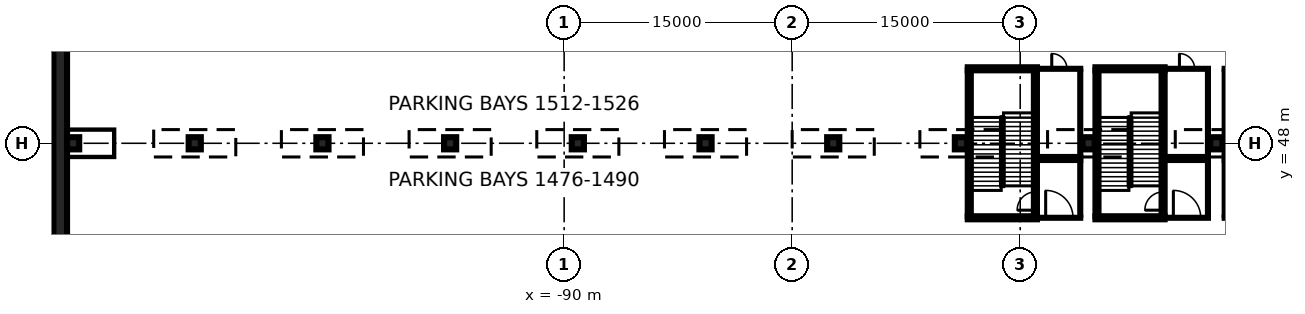
"""IFC4 building model, lengths in metres.
Left out: names, types, materials, properties, quantities, classifications, styles, units other than length and angle.
Written with IfcOpenShell. Run it as: python <this file> out.ifc"""

import sys

from ifc_helpers import new_model, si_unit, direction, frame, frame_2d, origin, origin_2d, place, context, subcontext, project, spatial, rectangle, extrude, element, fill, save


model = new_model("IFC4")
c1 = context("Model", 3, precision=1e-05, world=origin(), true_north=direction((0.0, 1.0)))
c2 = subcontext(c1, "Body", "Model", "MODEL_VIEW")
j1 = project(units=[si_unit("LENGTHUNIT", "METRE"), si_unit("PLANEANGLEUNIT", "RADIAN")], contexts=[c1])
p1 = place(None, origin())
s1 = spatial("IfcSite", under=j1, at=p1, CompositionType="ELEMENT")
p2 = place(p1, origin())
s2 = spatial("IfcBuilding", under=s1, at=p2, CompositionType="ELEMENT")
p3 = place(p2, frame((0.0, 0.0, -12.0)))
s3 = spatial("IfcBuildingStorey", under=s2, at=p3, CompositionType="ELEMENT", Elevation=-12.0)
p4 = place(p3, frame((-123.15, -80.0, 0.0), z_axis=(0.0, 0.0, 1.0), x_axis=(0.0, 1.0, 0.0)))
e1 = element("IfcWall", 1, at=p4, inside=s3, PredefinedType="USERDEFINED", context=c2, shape_type="SweptSolid", body=[
    extrude(rectangle(XDim=160.0, YDim=0.9, at=frame_2d((80.0, 0.0))), origin(), (0.0, 0.0, 1.0), 11.55),
])
for number, where, z_axis, x_axis in (
    (2, (-122.3, 48.0, 0.0), (0.0, 0.0, 1.0), (1.0, 0.0, 0.0)),
    (3, (-114.3, 48.0, 0.0), (0.0, 0.0, 1.0), (1.0, 0.0, 0.0)),
    (4, (-105.9, 48.0, 0.0), (0.0, 0.0, 1.0), (1.0, 0.0, 0.0)),
    (5, (-97.5, 48.0, 0.0), (0.0, 0.0, 1.0), (1.0, 0.0, 0.0)),
    (6, (-89.1, 48.0, 0.0), (0.0, 0.0, 1.0), (1.0, 0.0, 0.0)),
    (7, (-80.7, 48.0, 0.0), (0.0, 0.0, 1.0), (1.0, 0.0, 0.0)),
    (8, (-72.3, 48.0, 0.0), (0.0, 0.0, 1.0), (1.0, 0.0, 0.0)),
    (9, (-63.9, 48.0, 0.0), (0.0, 0.0, 1.0), (1.0, 0.0, 0.0)),
    (10, (-55.5, 48.0, 0.0), (0.0, 0.0, 1.0), (1.0, 0.0, 0.0)),
    (11, (-47.1, 48.0, 0.0), (0.0, 0.0, 1.0), (1.0, 0.0, 0.0)),
):
    element("IfcColumn", number, at=place(p3, frame(where, z_axis=z_axis, x_axis=x_axis)), inside=s3, PredefinedType="COLUMN", context=c2, shape_type="SweptSolid", body=[
        extrude(rectangle(XDim=0.8, YDim=0.8, at=origin_2d()), origin(), (0.0, 0.0, 1.0), 4.4),
    ])
p5 = place(p3, frame((-58.9, 43.1, 0.0), z_axis=(0.0, 0.0, 1.0), x_axis=(1.0, 0.0, 0.0)))
e12 = element("IfcWall", 12, at=p5, inside=s3, PredefinedType="PARTITIONING", context=c2, shape_type="SweptSolid", body=[
    extrude(rectangle(XDim=2.95, YDim=0.2, at=frame_2d((1.475, 0.0))), origin(), (0.0, 0.0, 1.0), 4.4),
])
p6 = place(p5, frame((0.575, 0.0, 0.0)))
e13 = element("IfcOpeningElement", 13, at=p6, cuts=e12, PredefinedType="OPENING", context=c2, shape_type="SweptSolid", body=[
    extrude(rectangle(XDim=1.8, YDim=2.1, at=frame_2d((0.9, 1.05))), frame((0.0, 0.11, 0.0), z_axis=(0.0, -1.0, 0.0), x_axis=(1.0, 0.0, 0.0)), (0.0, 0.0, 1.0), 0.22),
])
p7 = place(p3, frame((-58.9, 46.9, 0.0), z_axis=(0.0, 0.0, 1.0), x_axis=(1.0, 0.0, 0.0)))
e14 = element("IfcWall", 14, at=p7, inside=s3, PredefinedType="PARTITIONING", context=c2, shape_type="SweptSolid", body=[
    extrude(rectangle(XDim=2.95, YDim=0.2, at=frame_2d((1.475, 0.0))), origin(), (0.0, 0.0, 1.0), 4.4),
])
p8 = place(p3, frame((-56.05, 43.2, 0.0), z_axis=(0.0, 0.0, 1.0), x_axis=(0.0, 1.0, 0.0)))
e15 = element("IfcWall", 15, at=p8, inside=s3, PredefinedType="PARTITIONING", context=c2, shape_type="SweptSolid", body=[
    extrude(rectangle(XDim=3.6, YDim=0.2, at=frame_2d((1.8, 0.0))), origin(), (0.0, 0.0, 1.0), 4.4),
])
p9 = place(p3, frame((-58.9, 47.1, 0.0), z_axis=(0.0, 0.0, 1.0), x_axis=(1.0, 0.0, 0.0)))
e16 = element("IfcWall", 16, at=p9, inside=s3, PredefinedType="PARTITIONING", context=c2, shape_type="SweptSolid", body=[
    extrude(rectangle(XDim=2.95, YDim=0.2, at=frame_2d((1.475, 0.0))), origin(), (0.0, 0.0, 1.0), 4.4),
])
p10 = place(p3, frame((-58.9, 52.9, 0.0), z_axis=(0.0, 0.0, 1.0), x_axis=(1.0, 0.0, 0.0)))
e17 = element("IfcWall", 17, at=p10, inside=s3, PredefinedType="PARTITIONING", context=c2, shape_type="SweptSolid", body=[
    extrude(rectangle(XDim=2.95, YDim=0.2, at=frame_2d((1.475, 0.0))), origin(), (0.0, 0.0, 1.0), 4.4),
])
p11 = place(p10, frame((0.975, 0.0, 0.0)))
e18 = element("IfcOpeningElement", 18, at=p11, cuts=e17, PredefinedType="OPENING", context=c2, shape_type="SweptSolid", body=[
    extrude(rectangle(XDim=1.0, YDim=2.1, at=frame_2d((0.5, 1.05))), frame((0.0, 0.11, 0.0), z_axis=(0.0, -1.0, 0.0), x_axis=(1.0, 0.0, 0.0)), (0.0, 0.0, 1.0), 0.22),
])
p12 = place(p3, frame((-56.05, 47.2, 0.0), z_axis=(0.0, 0.0, 1.0), x_axis=(0.0, 1.0, 0.0)))
e19 = element("IfcWall", 19, at=p12, inside=s3, PredefinedType="PARTITIONING", context=c2, shape_type="SweptSolid", body=[
    extrude(rectangle(XDim=5.6, YDim=0.2, at=frame_2d((2.8, 0.0))), origin(), (0.0, 0.0, 1.0), 4.4),
])
p13 = place(p3, frame((-50.5, 43.1, 0.0), z_axis=(0.0, 0.0, 1.0), x_axis=(1.0, 0.0, 0.0)))
e20 = element("IfcWall", 20, at=p13, inside=s3, PredefinedType="PARTITIONING", context=c2, shape_type="SweptSolid", body=[
    extrude(rectangle(XDim=2.95, YDim=0.2, at=frame_2d((1.475, 0.0))), origin(), (0.0, 0.0, 1.0), 4.4),
])
p14 = place(p13, frame((0.575, 0.0, 0.0)))
e21 = element("IfcOpeningElement", 21, at=p14, cuts=e20, PredefinedType="OPENING", context=c2, shape_type="SweptSolid", body=[
    extrude(rectangle(XDim=1.8, YDim=2.1, at=frame_2d((0.9, 1.05))), frame((0.0, 0.11, 0.0), z_axis=(0.0, -1.0, 0.0), x_axis=(1.0, 0.0, 0.0)), (0.0, 0.0, 1.0), 0.22),
])
p15 = place(p3, frame((-50.5, 46.9, 0.0), z_axis=(0.0, 0.0, 1.0), x_axis=(1.0, 0.0, 0.0)))
e22 = element("IfcWall", 22, at=p15, inside=s3, PredefinedType="PARTITIONING", context=c2, shape_type="SweptSolid", body=[
    extrude(rectangle(XDim=2.95, YDim=0.2, at=frame_2d((1.475, 0.0))), origin(), (0.0, 0.0, 1.0), 4.4),
])
p16 = place(p3, frame((-47.65, 43.2, 0.0), z_axis=(0.0, 0.0, 1.0), x_axis=(0.0, 1.0, 0.0)))
e23 = element("IfcWall", 23, at=p16, inside=s3, PredefinedType="PARTITIONING", context=c2, shape_type="SweptSolid", body=[
    extrude(rectangle(XDim=3.6, YDim=0.2, at=frame_2d((1.8, 0.0))), origin(), (0.0, 0.0, 1.0), 4.4),
])
p17 = place(p3, frame((-50.5, 47.1, 0.0), z_axis=(0.0, 0.0, 1.0), x_axis=(1.0, 0.0, 0.0)))
e24 = element("IfcWall", 24, at=p17, inside=s3, PredefinedType="PARTITIONING", context=c2, shape_type="SweptSolid", body=[
    extrude(rectangle(XDim=2.95, YDim=0.2, at=frame_2d((1.475, 0.0))), origin(), (0.0, 0.0, 1.0), 4.4),
])
p18 = place(p3, frame((-50.5, 52.9, 0.0), z_axis=(0.0, 0.0, 1.0), x_axis=(1.0, 0.0, 0.0)))
e25 = element("IfcWall", 25, at=p18, inside=s3, PredefinedType="PARTITIONING", context=c2, shape_type="SweptSolid", body=[
    extrude(rectangle(XDim=2.95, YDim=0.2, at=frame_2d((1.475, 0.0))), origin(), (0.0, 0.0, 1.0), 4.4),
])
p19 = place(p18, frame((0.975, 0.0, 0.0)))
e26 = element("IfcOpeningElement", 26, at=p19, cuts=e25, PredefinedType="OPENING", context=c2, shape_type="SweptSolid", body=[
    extrude(rectangle(XDim=1.0, YDim=2.1, at=frame_2d((0.5, 1.05))), frame((0.0, 0.11, 0.0), z_axis=(0.0, -1.0, 0.0), x_axis=(1.0, 0.0, 0.0)), (0.0, 0.0, 1.0), 0.22),
])
p20 = place(p3, frame((-47.65, 47.2, 0.0), z_axis=(0.0, 0.0, 1.0), x_axis=(0.0, 1.0, 0.0)))
e27 = element("IfcWall", 27, at=p20, inside=s3, PredefinedType="PARTITIONING", context=c2, shape_type="SweptSolid", body=[
    extrude(rectangle(XDim=5.6, YDim=0.2, at=frame_2d((2.8, 0.0))), origin(), (0.0, 0.0, 1.0), 4.4),
])
p21 = place(p3, frame((-46.65, 43.1, 0.0), z_axis=(0.0, 0.0, 1.0), x_axis=(1.0, 0.0, 0.0)))
e28 = element("IfcWall", 28, at=p21, inside=s3, PredefinedType="PARTITIONING", context=c2, shape_type="SweptSolid", body=[
    extrude(rectangle(XDim=2.95, YDim=0.2, at=frame_2d((1.475, 0.0))), origin(), (0.0, 0.0, 1.0), 4.4),
])
p22 = place(p21, frame((0.575, 0.0, 0.0)))
e29 = element("IfcOpeningElement", 29, at=p22, cuts=e28, PredefinedType="OPENING", context=c2, shape_type="SweptSolid", body=[
    extrude(rectangle(XDim=1.8, YDim=2.1, at=frame_2d((0.9, 1.05))), frame((0.0, 0.11, 0.0), z_axis=(0.0, -1.0, 0.0), x_axis=(1.0, 0.0, 0.0)), (0.0, 0.0, 1.0), 0.22),
])
p23 = place(p3, frame((-46.65, 46.9, 0.0), z_axis=(0.0, 0.0, 1.0), x_axis=(1.0, 0.0, 0.0)))
e30 = element("IfcWall", 30, at=p23, inside=s3, PredefinedType="PARTITIONING", context=c2, shape_type="SweptSolid", body=[
    extrude(rectangle(XDim=2.95, YDim=0.2, at=frame_2d((1.475, 0.0))), origin(), (0.0, 0.0, 1.0), 4.4),
])
p24 = place(p3, frame((-46.55, 43.2, 0.0), z_axis=(0.0, 0.0, 1.0), x_axis=(0.0, 1.0, 0.0)))
e31 = element("IfcWall", 31, at=p24, inside=s3, PredefinedType="PARTITIONING", context=c2, shape_type="SweptSolid", body=[
    extrude(rectangle(XDim=3.6, YDim=0.2, at=frame_2d((1.8, 0.0))), origin(), (0.0, 0.0, 1.0), 4.4),
])
p25 = place(p3, frame((-46.65, 47.1, 0.0), z_axis=(0.0, 0.0, 1.0), x_axis=(1.0, 0.0, 0.0)))
e32 = element("IfcWall", 32, at=p25, inside=s3, PredefinedType="PARTITIONING", context=c2, shape_type="SweptSolid", body=[
    extrude(rectangle(XDim=2.95, YDim=0.2, at=frame_2d((1.475, 0.0))), origin(), (0.0, 0.0, 1.0), 4.4),
])
p26 = place(p3, frame((-46.65, 52.9, 0.0), z_axis=(0.0, 0.0, 1.0), x_axis=(1.0, 0.0, 0.0)))
e33 = element("IfcWall", 33, at=p26, inside=s3, PredefinedType="PARTITIONING", context=c2, shape_type="SweptSolid", body=[
    extrude(rectangle(XDim=2.95, YDim=0.2, at=frame_2d((1.475, 0.0))), origin(), (0.0, 0.0, 1.0), 4.4),
])
p27 = place(p26, frame((0.975, 0.0, 0.0)))
e34 = element("IfcOpeningElement", 34, at=p27, cuts=e33, PredefinedType="OPENING", context=c2, shape_type="SweptSolid", body=[
    extrude(rectangle(XDim=1.0, YDim=2.1, at=frame_2d((0.5, 1.05))), frame((0.0, 0.11, 0.0), z_axis=(0.0, -1.0, 0.0), x_axis=(1.0, 0.0, 0.0)), (0.0, 0.0, 1.0), 0.22),
])
p28 = place(p3, frame((-46.55, 47.2, 0.0), z_axis=(0.0, 0.0, 1.0), x_axis=(0.0, 1.0, 0.0)))
e35 = element("IfcWall", 35, at=p28, inside=s3, PredefinedType="PARTITIONING", context=c2, shape_type="SweptSolid", body=[
    extrude(rectangle(XDim=5.6, YDim=0.2, at=frame_2d((2.8, 0.0))), origin(), (0.0, 0.0, 1.0), 4.4),
])
p29 = place(p3, frame((-63.35, 43.2, 0.0), z_axis=(0.0, 0.0, 1.0), x_axis=(0.0, 1.0, 0.0)))
e36 = element("IfcWall", 36, at=p29, inside=s3, PredefinedType="SOLIDWALL", context=c2, shape_type="SweptSolid", body=[
    extrude(rectangle(XDim=9.6, YDim=0.2, at=frame_2d((4.8, 0.0))), origin(), (0.0, 0.0, 1.0), 4.4),
])
p30 = place(p3, frame((-59.0, 43.2, 0.0), z_axis=(0.0, 0.0, 1.0), x_axis=(0.0, 1.0, 0.0)))
e37 = element("IfcWall", 37, at=p30, inside=s3, PredefinedType="SOLIDWALL", context=c2, shape_type="SweptSolid", body=[
    extrude(rectangle(XDim=9.6, YDim=0.2, at=frame_2d((4.8, 0.0))), origin(), (0.0, 0.0, 1.0), 4.4),
])
p31 = place(p30, frame((0.4, 0.0, 0.0)))
e38 = element("IfcOpeningElement", 38, at=p31, cuts=e37, PredefinedType="OPENING", context=c2, shape_type="SweptSolid", body=[
    extrude(rectangle(XDim=1.2, YDim=2.1, at=frame_2d((0.6, 1.05))), frame((0.0, 0.11, 0.0), z_axis=(0.0, -1.0, 0.0), x_axis=(1.0, 0.0, 0.0)), (0.0, 0.0, 1.0), 0.22),
])
for number, where, z_axis, x_axis in (
    (39, (-58.9, 43.1, 0.0), (0.0, 0.0, 1.0), (-1.0, 0.0, 0.0)),
    (40, (-63.45, 52.9, 0.0), (0.0, 0.0, 1.0), (1.0, 0.0, 0.0)),
):
    element("IfcWall", number, at=place(p3, frame(where, z_axis=z_axis, x_axis=x_axis)), inside=s3, PredefinedType="SOLIDWALL", context=c2, shape_type="SweptSolid", body=[
        extrude(rectangle(XDim=4.55, YDim=0.2, at=frame_2d((2.275, 0.0))), origin(), (0.0, 0.0, 1.0), 4.4),
    ])
p32 = place(p3, frame((-54.95, 43.2, 0.0), z_axis=(0.0, 0.0, 1.0), x_axis=(0.0, 1.0, 0.0)))
e41 = element("IfcWall", 41, at=p32, inside=s3, PredefinedType="SOLIDWALL", context=c2, shape_type="SweptSolid", body=[
    extrude(rectangle(XDim=9.6, YDim=0.2, at=frame_2d((4.8, 0.0))), origin(), (0.0, 0.0, 1.0), 4.4),
])
p33 = place(p3, frame((-50.6, 43.2, 0.0), z_axis=(0.0, 0.0, 1.0), x_axis=(0.0, 1.0, 0.0)))
e42 = element("IfcWall", 42, at=p33, inside=s3, PredefinedType="SOLIDWALL", context=c2, shape_type="SweptSolid", body=[
    extrude(rectangle(XDim=9.6, YDim=0.2, at=frame_2d((4.8, 0.0))), origin(), (0.0, 0.0, 1.0), 4.4),
])
p34 = place(p33, frame((0.4, 0.0, 0.0)))
e43 = element("IfcOpeningElement", 43, at=p34, cuts=e42, PredefinedType="OPENING", context=c2, shape_type="SweptSolid", body=[
    extrude(rectangle(XDim=1.2, YDim=2.1, at=frame_2d((0.6, 1.05))), frame((0.0, 0.11, 0.0), z_axis=(0.0, -1.0, 0.0), x_axis=(1.0, 0.0, 0.0)), (0.0, 0.0, 1.0), 0.22),
])
for number, where, z_axis, x_axis in (
    (44, (-50.5, 43.1, 0.0), (0.0, 0.0, 1.0), (-1.0, 0.0, 0.0)),
    (45, (-55.05, 52.9, 0.0), (0.0, 0.0, 1.0), (1.0, 0.0, 0.0)),
):
    element("IfcWall", number, at=place(p3, frame(where, z_axis=z_axis, x_axis=x_axis)), inside=s3, PredefinedType="SOLIDWALL", context=c2, shape_type="SweptSolid", body=[
        extrude(rectangle(XDim=4.55, YDim=0.2, at=frame_2d((2.275, 0.0))), origin(), (0.0, 0.0, 1.0), 4.4),
    ])
p35 = place(p6, origin())
e46 = element("IfcDoor", 46, at=p35, inside=s3, OperationType="DOUBLE_DOOR_SINGLE_SWING", PredefinedType="DOOR", context=c2, shape_type="SweptSolid", body=[
    extrude(rectangle(XDim=1.8, YDim=2.1, at=frame_2d((0.9, 1.05))), frame((0.0, 0.025, 0.0), z_axis=(0.0, -1.0, 0.0), x_axis=(1.0, 0.0, 0.0)), (0.0, 0.0, 1.0), 0.05),
])
fill(e13, e46)
p36 = place(p11, origin())
e47 = element("IfcDoor", 47, at=p36, inside=s3, OperationType="SINGLE_SWING_LEFT", PredefinedType="DOOR", context=c2, shape_type="SweptSolid", body=[
    extrude(rectangle(XDim=1.0, YDim=2.1, at=frame_2d((0.5, 1.05))), frame((0.0, 0.025, 0.0), z_axis=(0.0, -1.0, 0.0), x_axis=(1.0, 0.0, 0.0)), (0.0, 0.0, 1.0), 0.05),
])
fill(e18, e47)
p37 = place(p14, origin())
e48 = element("IfcDoor", 48, at=p37, inside=s3, OperationType="DOUBLE_DOOR_SINGLE_SWING", PredefinedType="DOOR", context=c2, shape_type="SweptSolid", body=[
    extrude(rectangle(XDim=1.8, YDim=2.1, at=frame_2d((0.9, 1.05))), frame((0.0, 0.025, 0.0), z_axis=(0.0, -1.0, 0.0), x_axis=(1.0, 0.0, 0.0)), (0.0, 0.0, 1.0), 0.05),
])
fill(e21, e48)
p38 = place(p19, origin())
e49 = element("IfcDoor", 49, at=p38, inside=s3, OperationType="SINGLE_SWING_LEFT", PredefinedType="DOOR", context=c2, shape_type="SweptSolid", body=[
    extrude(rectangle(XDim=1.0, YDim=2.1, at=frame_2d((0.5, 1.05))), frame((0.0, 0.025, 0.0), z_axis=(0.0, -1.0, 0.0), x_axis=(1.0, 0.0, 0.0)), (0.0, 0.0, 1.0), 0.05),
])
fill(e26, e49)
p39 = place(p31, origin())
e50 = element("IfcDoor", 50, at=p39, inside=s3, OperationType="SINGLE_SWING_LEFT", PredefinedType="DOOR", context=c2, shape_type="SweptSolid", body=[
    extrude(rectangle(XDim=1.2, YDim=2.1, at=frame_2d((0.6, 1.05))), frame((0.0, 0.025, 0.0), z_axis=(0.0, -1.0, 0.0), x_axis=(1.0, 0.0, 0.0)), (0.0, 0.0, 1.0), 0.05),
])
fill(e38, e50)
p40 = place(p34, origin())
e51 = element("IfcDoor", 51, at=p40, inside=s3, OperationType="SINGLE_SWING_LEFT", PredefinedType="DOOR", context=c2, shape_type="SweptSolid", body=[
    extrude(rectangle(XDim=1.2, YDim=2.1, at=frame_2d((0.6, 1.05))), frame((0.0, 0.025, 0.0), z_axis=(0.0, -1.0, 0.0), x_axis=(1.0, 0.0, 0.0)), (0.0, 0.0, 1.0), 0.05),
])
fill(e43, e51)
save(model, sys.argv[1])
